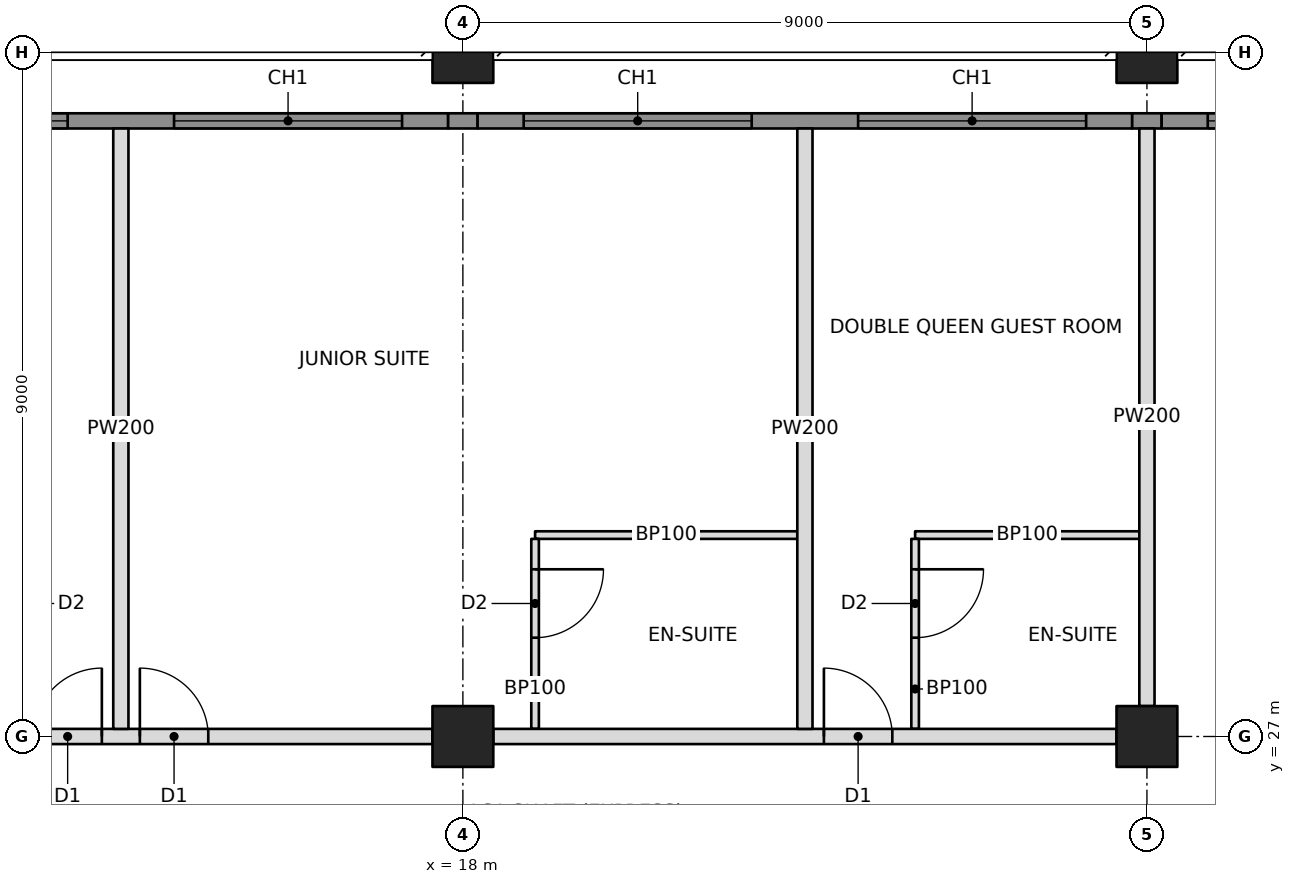
"""IFC4 building model, lengths in metres.
Left out: names, types, materials, properties, quantities, classifications, styles, units other than length and angle.
Written with IfcOpenShell. Run it as: python <this file> out.ifc"""

import sys

from ifc_helpers import new_model, si_unit, direction, frame, frame_2d, origin, origin_2d, place, context, subcontext, project, spatial, rectangle, hollow_rectangle, extrude, element, fill, save


model = new_model("IFC4")
c1 = context("Model", 3, precision=1e-05, world=origin(), true_north=direction((0.0, 1.0)))
c2 = subcontext(c1, "Body", "Model", "MODEL_VIEW")
j1 = project(units=[si_unit("LENGTHUNIT", "METRE"), si_unit("PLANEANGLEUNIT", "RADIAN")], contexts=[c1])
p1 = place(None, origin())
s1 = spatial("IfcSite", under=j1, at=p1, CompositionType="ELEMENT")
p2 = place(p1, origin())
s2 = spatial("IfcBuilding", under=s1, at=p2, CompositionType="ELEMENT")
p3 = place(p2, frame((0.0, 0.0, 51.8)))
s3 = spatial("IfcBuildingStorey", under=s2, at=p3, CompositionType="ELEMENT", Elevation=51.8)
for number, where, z_axis, x_axis in (
    (1, (18.0, 27.0, 0.0), (0.0, 0.0, 1.0), (1.0, 0.0, 0.0)),
    (2, (18.0, 36.0, 0.0), (0.0, 0.0, 1.0), (1.0, 0.0, 0.0)),
    (3, (27.0, 27.0, 0.0), (0.0, 0.0, 1.0), (1.0, 0.0, 0.0)),
    (4, (27.0, 36.0, 0.0), (0.0, 0.0, 1.0), (1.0, 0.0, 0.0)),
):
    element("IfcColumn", number, at=place(p3, frame(where, z_axis=z_axis, x_axis=x_axis)), inside=s3, PredefinedType="COLUMN", context=c2, shape_type="SweptSolid", body=[
        extrude(hollow_rectangle(XDim=0.8, YDim=0.8, WallThickness=0.1, at=origin_2d()), origin(), (0.0, 0.0, 1.0), 3.4),
    ])
p4 = place(p3, frame((9.4, 27.0, 0.0), z_axis=(0.0, 0.0, 1.0), x_axis=(1.0, 0.0, 0.0)))
e5 = element("IfcWall", 5, at=p4, inside=s3, PredefinedType="PARTITIONING", context=c2, shape_type="SweptSolid", body=[
    extrude(rectangle(XDim=8.2, YDim=0.2, at=frame_2d((4.1, 0.0))), origin(), (0.0, 0.0, 1.0), 2.405),
])
p5 = place(p4, frame((2.95, 0.0, 0.0)))
e6 = element("IfcOpeningElement", 6, at=p5, cuts=e5, PredefinedType="OPENING", context=c2, shape_type="SweptSolid", body=[
    extrude(rectangle(XDim=0.9, YDim=2.1, at=frame_2d((0.45, 1.05))), frame((0.0, 0.11, 0.0), z_axis=(0.0, -1.0, 0.0), x_axis=(1.0, 0.0, 0.0)), (0.0, 0.0, 1.0), 0.22),
])
p6 = place(p4, frame((4.35, 0.0, 0.0)))
e7 = element("IfcOpeningElement", 7, at=p6, cuts=e5, PredefinedType="OPENING", context=c2, shape_type="SweptSolid", body=[
    extrude(rectangle(XDim=0.9, YDim=2.1, at=frame_2d((0.45, 1.05))), frame((0.0, 0.11, 0.0), z_axis=(0.0, -1.0, 0.0), x_axis=(1.0, 0.0, 0.0)), (0.0, 0.0, 1.0), 0.22),
])
p7 = place(p3, frame((18.4, 27.0, 0.0), z_axis=(0.0, 0.0, 1.0), x_axis=(1.0, 0.0, 0.0)))
e8 = element("IfcWall", 8, at=p7, inside=s3, PredefinedType="PARTITIONING", context=c2, shape_type="SweptSolid", body=[
    extrude(rectangle(XDim=8.2, YDim=0.2, at=frame_2d((4.1, 0.0))), origin(), (0.0, 0.0, 1.0), 2.405),
])
p8 = place(p7, frame((4.35, 0.0, 0.0)))
e9 = element("IfcOpeningElement", 9, at=p8, cuts=e8, PredefinedType="OPENING", context=c2, shape_type="SweptSolid", body=[
    extrude(rectangle(XDim=0.9, YDim=2.1, at=frame_2d((0.45, 1.05))), frame((0.0, 0.11, 0.0), z_axis=(0.0, -1.0, 0.0), x_axis=(1.0, 0.0, 0.0)), (0.0, 0.0, 1.0), 0.22),
])
for number, where, z_axis, x_axis in (
    (10, (13.5, 27.1, 0.0), (0.0, 0.0, 1.0), (0.0, 1.0, 0.0)),
    (11, (22.5, 27.1, 0.0), (0.0, 0.0, 1.0), (0.0, 1.0, 0.0)),
):
    element("IfcWall", number, at=place(p3, frame(where, z_axis=z_axis, x_axis=x_axis)), inside=s3, PredefinedType="PARTITIONING", context=c2, shape_type="SweptSolid", body=[
        extrude(rectangle(XDim=7.9, YDim=0.2, at=frame_2d((3.95, 0.0))), origin(), (0.0, 0.0, 1.0), 2.404),
    ])
p9 = place(p3, frame((27.0, 27.4, 0.0), z_axis=(0.0, 0.0, 1.0), x_axis=(0.0, 1.0, 0.0)))
e12 = element("IfcWall", 12, at=p9, inside=s3, PredefinedType="PARTITIONING", context=c2, shape_type="SweptSolid", body=[
    extrude(rectangle(XDim=7.6, YDim=0.2, at=frame_2d((3.8, 0.0))), origin(), (0.0, 0.0, 1.0), 2.405),
])
p10 = place(p3, frame((18.95, 29.65, 0.0), z_axis=(0.0, 0.0, 1.0), x_axis=(1.0, 0.0, 0.0)))
e13 = element("IfcWall", 13, at=p10, inside=s3, PredefinedType="PARTITIONING", context=c2, shape_type="SweptSolid", body=[
    extrude(rectangle(XDim=3.45, YDim=0.1, at=frame_2d((1.725, 0.0))), origin(), (0.0, 0.0, 1.0), 3.2),
])
p11 = place(p3, frame((18.95, 27.1, 0.0), z_axis=(0.0, 0.0, 1.0), x_axis=(0.0, 1.0, 0.0)))
e14 = element("IfcWall", 14, at=p11, inside=s3, PredefinedType="PARTITIONING", context=c2, shape_type="SweptSolid", body=[
    extrude(rectangle(XDim=2.5, YDim=0.1, at=frame_2d((1.25, 0.0))), origin(), (0.0, 0.0, 1.0), 2.404),
])
p12 = place(p11, frame((1.2, 0.0, 0.0)))
e15 = element("IfcOpeningElement", 15, at=p12, cuts=e14, PredefinedType="OPENING", context=c2, shape_type="SweptSolid", body=[
    extrude(rectangle(XDim=0.9, YDim=2.1, at=frame_2d((0.45, 1.05))), frame((0.0, 0.06, 0.0), z_axis=(0.0, -1.0, 0.0), x_axis=(1.0, 0.0, 0.0)), (0.0, 0.0, 1.0), 0.12),
])
p13 = place(p3, frame((23.95, 29.65, 0.0), z_axis=(0.0, 0.0, 1.0), x_axis=(1.0, 0.0, 0.0)))
e16 = element("IfcWall", 16, at=p13, inside=s3, PredefinedType="PARTITIONING", context=c2, shape_type="SweptSolid", body=[
    extrude(rectangle(XDim=2.95, YDim=0.1, at=frame_2d((1.475, 0.0))), origin(), (0.0, 0.0, 1.0), 2.404),
])
p14 = place(p3, frame((23.95, 27.1, 0.0), z_axis=(0.0, 0.0, 1.0), x_axis=(0.0, 1.0, 0.0)))
e17 = element("IfcWall", 17, at=p14, inside=s3, PredefinedType="PARTITIONING", context=c2, shape_type="SweptSolid", body=[
    extrude(rectangle(XDim=2.5, YDim=0.1, at=frame_2d((1.25, 0.0))), origin(), (0.0, 0.0, 1.0), 2.404),
])
p15 = place(p14, frame((1.2, 0.0, 0.0)))
e18 = element("IfcOpeningElement", 18, at=p15, cuts=e17, PredefinedType="OPENING", context=c2, shape_type="SweptSolid", body=[
    extrude(rectangle(XDim=0.9, YDim=2.1, at=frame_2d((0.45, 1.05))), frame((0.0, 0.06, 0.0), z_axis=(0.0, -1.0, 0.0), x_axis=(1.0, 0.0, 0.0)), (0.0, 0.0, 1.0), 0.12),
])
p16 = place(p3, frame((9.135, 35.1, 0.0), z_axis=(0.0, 0.0, 1.0), x_axis=(1.0, 0.0, 0.0)))
e19 = element("IfcWall", 19, at=p16, inside=s3, PredefinedType="SOLIDWALL", context=c2, shape_type="SweptSolid", body=[
    extrude(rectangle(XDim=8.671, YDim=0.2, at=frame_2d((4.335, 0.0))), origin(), (0.0, 0.0, 1.0), 3.2),
])
p17 = place(p16, frame((0.665, 0.0, 0.6)))
e20 = element("IfcOpeningElement", 20, at=p17, cuts=e19, PredefinedType="OPENING", context=c2, shape_type="SweptSolid", body=[
    extrude(rectangle(XDim=3.0, YDim=2.2, at=frame_2d((1.5, 1.1))), frame((0.0, 0.11, 0.0), z_axis=(0.0, -1.0, 0.0), x_axis=(1.0, 0.0, 0.0)), (0.0, 0.0, 1.0), 0.22),
])
p18 = place(p16, frame((5.065, 0.0, 0.6)))
e21 = element("IfcOpeningElement", 21, at=p18, cuts=e19, PredefinedType="OPENING", context=c2, shape_type="SweptSolid", body=[
    extrude(rectangle(XDim=3.0, YDim=2.2, at=frame_2d((1.5, 1.1))), frame((0.0, 0.11, 0.0), z_axis=(0.0, -1.0, 0.0), x_axis=(1.0, 0.0, 0.0)), (0.0, 0.0, 1.0), 0.22),
])
p19 = place(p3, frame((17.806, 35.1, 0.0), z_axis=(0.0, 0.0, 1.0), x_axis=(1.0, 0.0, 0.0)))
e22 = element("IfcWall", 22, at=p19, inside=s3, PredefinedType="SOLIDWALL", context=c2, shape_type="SweptSolid", body=[
    extrude(rectangle(XDim=0.388, YDim=0.2, at=frame_2d((0.194, 0.0))), origin(), (0.0, 0.0, 1.0), 2.404),
])
p20 = place(p3, frame((18.194, 35.1, 0.0), z_axis=(0.0, 0.0, 1.0), x_axis=(1.0, 0.0, 0.0)))
e23 = element("IfcWall", 23, at=p20, inside=s3, PredefinedType="SOLIDWALL", context=c2, shape_type="SweptSolid", body=[
    extrude(rectangle(XDim=8.612, YDim=0.2, at=frame_2d((4.306, 0.0))), origin(), (0.0, 0.0, 1.0), 3.2),
])
p21 = place(p20, frame((0.606, 0.0, 0.6)))
e24 = element("IfcOpeningElement", 24, at=p21, cuts=e23, PredefinedType="OPENING", context=c2, shape_type="SweptSolid", body=[
    extrude(rectangle(XDim=3.0, YDim=2.2, at=frame_2d((1.5, 1.1))), frame((0.0, 0.11, 0.0), z_axis=(0.0, -1.0, 0.0), x_axis=(1.0, 0.0, 0.0)), (0.0, 0.0, 1.0), 0.22),
])
p22 = place(p20, frame((5.006, 0.0, 0.6)))
e25 = element("IfcOpeningElement", 25, at=p22, cuts=e23, PredefinedType="OPENING", context=c2, shape_type="SweptSolid", body=[
    extrude(rectangle(XDim=3.0, YDim=2.2, at=frame_2d((1.5, 1.1))), frame((0.0, 0.11, 0.0), z_axis=(0.0, -1.0, 0.0), x_axis=(1.0, 0.0, 0.0)), (0.0, 0.0, 1.0), 0.22),
])
p23 = place(p3, frame((26.806, 35.1, 0.0), z_axis=(0.0, 0.0, 1.0), x_axis=(1.0, 0.0, 0.0)))
e26 = element("IfcWall", 26, at=p23, inside=s3, PredefinedType="SOLIDWALL", context=c2, shape_type="SweptSolid", body=[
    extrude(rectangle(XDim=0.388, YDim=0.2, at=frame_2d((0.194, 0.0))), origin(), (0.0, 0.0, 1.0), 2.404),
])
p24 = place(p3, frame((27.194, 35.1, 0.0), z_axis=(0.0, 0.0, 1.0), x_axis=(1.0, 0.0, 0.0)))
e27 = element("IfcWall", 27, at=p24, inside=s3, PredefinedType="SOLIDWALL", context=c2, shape_type="SweptSolid", body=[
    extrude(rectangle(XDim=8.671, YDim=0.2, at=frame_2d((4.335, 0.0))), origin(), (0.0, 0.0, 1.0), 3.2),
])
p25 = place(p24, frame((0.606, 0.0, 0.6)))
e28 = element("IfcOpeningElement", 28, at=p25, cuts=e27, PredefinedType="OPENING", context=c2, shape_type="SweptSolid", body=[
    extrude(rectangle(XDim=3.0, YDim=2.2, at=frame_2d((1.5, 1.1))), frame((0.0, 0.11, 0.0), z_axis=(0.0, -1.0, 0.0), x_axis=(1.0, 0.0, 0.0)), (0.0, 0.0, 1.0), 0.22),
])
p26 = place(p24, frame((5.006, 0.0, 0.6)))
e29 = element("IfcOpeningElement", 29, at=p26, cuts=e27, PredefinedType="OPENING", context=c2, shape_type="SweptSolid", body=[
    extrude(rectangle(XDim=3.0, YDim=2.2, at=frame_2d((1.5, 1.1))), frame((0.0, 0.11, 0.0), z_axis=(0.0, -1.0, 0.0), x_axis=(1.0, 0.0, 0.0)), (0.0, 0.0, 1.0), 0.22),
])
p27 = place(p17, origin())
e30 = element("IfcWindow", 30, at=p27, inside=s3, PartitioningType="TRIPLE_PANEL_VERTICAL", PredefinedType="WINDOW", context=c2, shape_type="SweptSolid", body=[
    extrude(rectangle(XDim=3.0, YDim=2.2, at=frame_2d((1.5, 1.1))), frame((0.0, 0.03, 0.0), z_axis=(0.0, -1.0, 0.0), x_axis=(1.0, 0.0, 0.0)), (0.0, 0.0, 1.0), 0.06),
])
fill(e20, e30)
p28 = place(p18, origin())
e31 = element("IfcWindow", 31, at=p28, inside=s3, PartitioningType="TRIPLE_PANEL_VERTICAL", PredefinedType="WINDOW", context=c2, shape_type="SweptSolid", body=[
    extrude(rectangle(XDim=3.0, YDim=2.2, at=frame_2d((1.5, 1.1))), frame((0.0, 0.03, 0.0), z_axis=(0.0, -1.0, 0.0), x_axis=(1.0, 0.0, 0.0)), (0.0, 0.0, 1.0), 0.06),
])
fill(e21, e31)
p29 = place(p21, origin())
e32 = element("IfcWindow", 32, at=p29, inside=s3, PartitioningType="TRIPLE_PANEL_VERTICAL", PredefinedType="WINDOW", context=c2, shape_type="SweptSolid", body=[
    extrude(rectangle(XDim=3.0, YDim=2.2, at=frame_2d((1.5, 1.1))), frame((0.0, 0.03, 0.0), z_axis=(0.0, -1.0, 0.0), x_axis=(1.0, 0.0, 0.0)), (0.0, 0.0, 1.0), 0.06),
])
fill(e24, e32)
p30 = place(p22, origin())
e33 = element("IfcWindow", 33, at=p30, inside=s3, PartitioningType="TRIPLE_PANEL_VERTICAL", PredefinedType="WINDOW", context=c2, shape_type="SweptSolid", body=[
    extrude(rectangle(XDim=3.0, YDim=2.2, at=frame_2d((1.5, 1.1))), frame((0.0, 0.03, 0.0), z_axis=(0.0, -1.0, 0.0), x_axis=(1.0, 0.0, 0.0)), (0.0, 0.0, 1.0), 0.06),
])
fill(e25, e33)
p31 = place(p25, origin())
e34 = element("IfcWindow", 34, at=p31, inside=s3, PartitioningType="TRIPLE_PANEL_VERTICAL", PredefinedType="WINDOW", context=c2, shape_type="SweptSolid", body=[
    extrude(rectangle(XDim=3.0, YDim=2.2, at=frame_2d((1.5, 1.1))), frame((0.0, 0.03, 0.0), z_axis=(0.0, -1.0, 0.0), x_axis=(1.0, 0.0, 0.0)), (0.0, 0.0, 1.0), 0.06),
])
fill(e28, e34)
p32 = place(p5, origin())
e35 = element("IfcDoor", 35, at=p32, inside=s3, OperationType="SINGLE_SWING_RIGHT", PredefinedType="DOOR", context=c2, shape_type="SweptSolid", body=[
    extrude(rectangle(XDim=0.9, YDim=2.1, at=frame_2d((0.45, 1.05))), frame((0.0, 0.025, 0.0), z_axis=(0.0, -1.0, 0.0), x_axis=(1.0, 0.0, 0.0)), (0.0, 0.0, 1.0), 0.05),
])
fill(e6, e35)
p33 = place(p12, frame((0.9, 0.0, 0.0), z_axis=(0.0, 0.0, 1.0), x_axis=(-1.0, 0.0, 0.0)))
e36 = element("IfcDoor", 36, at=p33, inside=s3, OperationType="SINGLE_SWING_LEFT", PredefinedType="DOOR", context=c2, shape_type="SweptSolid", body=[
    extrude(rectangle(XDim=0.9, YDim=2.1, at=frame_2d((0.45, 1.05))), frame((0.0, 0.025, 0.0), z_axis=(0.0, -1.0, 0.0), x_axis=(1.0, 0.0, 0.0)), (0.0, 0.0, 1.0), 0.05),
])
fill(e15, e36)
p34 = place(p6, origin())
e37 = element("IfcDoor", 37, at=p34, inside=s3, OperationType="SINGLE_SWING_LEFT", PredefinedType="DOOR", context=c2, shape_type="SweptSolid", body=[
    extrude(rectangle(XDim=0.9, YDim=2.1, at=frame_2d((0.45, 1.05))), frame((0.0, 0.025, 0.0), z_axis=(0.0, -1.0, 0.0), x_axis=(1.0, 0.0, 0.0)), (0.0, 0.0, 1.0), 0.05),
])
fill(e7, e37)
p35 = place(p15, frame((0.9, 0.0, 0.0), z_axis=(0.0, 0.0, 1.0), x_axis=(-1.0, 0.0, 0.0)))
e38 = element("IfcDoor", 38, at=p35, inside=s3, OperationType="SINGLE_SWING_LEFT", PredefinedType="DOOR", context=c2, shape_type="SweptSolid", body=[
    extrude(rectangle(XDim=0.9, YDim=2.1, at=frame_2d((0.45, 1.05))), frame((0.0, 0.025, 0.0), z_axis=(0.0, -1.0, 0.0), x_axis=(1.0, 0.0, 0.0)), (0.0, 0.0, 1.0), 0.05),
])
fill(e18, e38)
p36 = place(p8, origin())
e39 = element("IfcDoor", 39, at=p36, inside=s3, OperationType="SINGLE_SWING_LEFT", PredefinedType="DOOR", context=c2, shape_type="SweptSolid", body=[
    extrude(rectangle(XDim=0.9, YDim=2.1, at=frame_2d((0.45, 1.05))), frame((0.0, 0.025, 0.0), z_axis=(0.0, -1.0, 0.0), x_axis=(1.0, 0.0, 0.0)), (0.0, 0.0, 1.0), 0.05),
])
fill(e9, e39)
save(model, sys.argv[1])
